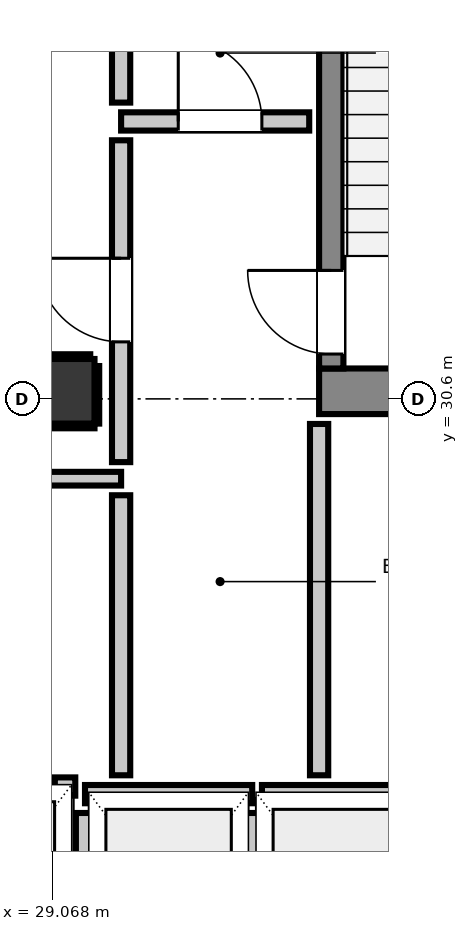
"""IFC4 building model, lengths in metres.
Left out: names, types, materials, properties, quantities, classifications, styles, units other than length and angle.
Written with IfcOpenShell. Run it as: python <this file> out.ifc"""

import sys

from ifc_helpers import new_model, si_unit, direction, frame, frame_2d, origin, origin_2d, place, context, subcontext, project, spatial, rectangle, extrude, element, fill, save


model = new_model("IFC4")
c1 = context("Model", 3, precision=1e-05, world=origin(), true_north=direction((0.0, 1.0)))
c2 = subcontext(c1, "Body", "Model", "MODEL_VIEW")
j1 = project(units=[si_unit("LENGTHUNIT", "METRE"), si_unit("PLANEANGLEUNIT", "RADIAN")], contexts=[c1])
p1 = place(None, origin())
s1 = spatial("IfcSite", under=j1, at=p1, CompositionType="ELEMENT")
p2 = place(p1, origin())
s2 = spatial("IfcBuilding", under=s1, at=p2, CompositionType="ELEMENT")
p3 = place(p2, frame((0.0, 0.0, 251.2)))
s3 = spatial("IfcBuildingStorey", under=s2, at=p3, CompositionType="ELEMENT", Elevation=251.2)
p4 = place(p3, frame((32.58, 30.7, 0.0), z_axis=(0.0, 0.0, 1.0), x_axis=(1.0, 0.0, 0.0)))
e1 = element("IfcWall", 1, at=p4, inside=s3, PredefinedType="SHEAR", context=c2, shape_type="SweptSolid", body=[
    extrude(rectangle(XDim=3.54, YDim=0.6, at=frame_2d((1.77, 0.0))), origin(), (0.0, 0.0, 1.0), 3.32),
])
p5 = place(p3, frame((32.74, 31.0, 0.0), z_axis=(0.0, 0.0, 1.0), x_axis=(0.0, 1.0, 0.0)))
e2 = element("IfcWall", 2, at=p5, inside=s3, PredefinedType="SHEAR", context=c2, shape_type="SweptSolid", body=[
    extrude(rectangle(XDim=7.8, YDim=0.32, at=frame_2d((3.9, 0.0))), origin(), (0.0, 0.0, 1.0), 3.32),
])
p6 = place(p5, frame((0.19, 0.0, 0.0)))
e3 = element("IfcOpeningElement", 3, at=p6, cuts=e2, PredefinedType="OPENING", context=c2, shape_type="SweptSolid", body=[
    extrude(rectangle(XDim=1.1, YDim=2.15, at=frame_2d((0.55, 1.075))), frame((0.0, 0.17, 0.0), z_axis=(0.0, -1.0, 0.0), x_axis=(1.0, 0.0, 0.0)), (0.0, 0.0, 1.0), 0.34),
])
p7 = place(p3, frame((29.2, 30.7, 0.0), z_axis=(0.0, 0.0, 1.0), x_axis=(1.0, 0.0, 0.0)))
e4 = element("IfcColumn", 4, at=p7, inside=s3, PredefinedType="COLUMN", context=c2, shape_type="SweptSolid", body=[
    extrude(rectangle(XDim=0.85, YDim=0.85, at=origin_2d()), origin(), (0.0, 0.0, 1.0), 3.32),
])
p8 = place(p3, frame((29.5, 25.4, 0.0), z_axis=(0.0, 0.0, 1.0), x_axis=(1.0, 0.0, 0.0)))
e5 = element("IfcWall", 5, at=p8, inside=s3, PredefinedType="PARTITIONING", context=c2, shape_type="SweptSolid", body=[
    extrude(rectangle(XDim=2.2, YDim=0.24, at=frame_2d((1.1, 0.0))), origin(), (0.0, 0.0, 1.0), 3.1),
])
p9 = place(p3, frame((29.5, 22.848, 0.0), z_axis=(0.0, 0.0, 1.0), x_axis=(0.0, 1.0, 0.0)))
e6 = element("IfcWall", 6, at=p9, inside=s3, PredefinedType="PARTITIONING", context=c2, shape_type="SweptSolid", body=[
    extrude(rectangle(XDim=2.304, YDim=0.24, at=frame_2d((1.152, 0.0))), origin(), (0.0, 0.0, 1.0), 2.335),
])
p10 = place(p3, frame((31.7, 22.848, 0.0), z_axis=(0.0, 0.0, 1.0), x_axis=(0.0, 1.0, 0.0)))
e7 = element("IfcWall", 7, at=p10, inside=s3, PredefinedType="PARTITIONING", context=c2, shape_type="SweptSolid", body=[
    extrude(rectangle(XDim=2.304, YDim=0.24, at=frame_2d((1.152, 0.0))), origin(), (0.0, 0.0, 1.0), 3.1),
])
p11 = place(p3, frame((31.828, 25.4, 0.0), z_axis=(0.0, 0.0, 1.0), x_axis=(1.0, 0.0, 0.0)))
e8 = element("IfcWall", 8, at=p11, inside=s3, PredefinedType="PARTITIONING", context=c2, shape_type="SweptSolid", body=[
    extrude(rectangle(XDim=2.072, YDim=0.24, at=frame_2d((1.036, 0.0))), origin(), (0.0, 0.0, 1.0), 3.1),
])
p12 = place(p3, frame((29.103, 25.5, 0.0), z_axis=(0.0, 0.0, 1.0), x_axis=(1.0, 0.0, 0.0)))
e9 = element("IfcWall", 9, at=p12, inside=s3, PredefinedType="PARTITIONING", context=c2, shape_type="SweptSolid", body=[
    extrude(rectangle(XDim=0.269, YDim=0.24, at=frame_2d((0.135, 0.0))), origin(), (0.0, 0.0, 1.0), 3.1),
])
p13 = place(p3, frame((29.975, 34.25, 0.0), z_axis=(0.0, 0.0, 1.0), x_axis=(1.0, 0.0, 0.0)))
e10 = element("IfcWall", 10, at=p13, inside=s3, PredefinedType="PARTITIONING", context=c2, shape_type="SweptSolid", body=[
    extrude(rectangle(XDim=2.475, YDim=0.24, at=frame_2d((1.237, 0.0))), origin(), (0.0, 0.0, 1.0), 3.1),
])
p14 = place(p13, frame((0.752, 0.0, 0.0)))
e11 = element("IfcOpeningElement", 11, at=p14, cuts=e10, PredefinedType="OPENING", context=c2, shape_type="SweptSolid", body=[
    extrude(rectangle(XDim=1.1, YDim=2.15, at=frame_2d((0.55, 1.075))), frame((0.0, 0.13, 0.0), z_axis=(0.0, -1.0, 0.0), x_axis=(1.0, 0.0, 0.0)), (0.0, 0.0, 1.0), 0.26),
])
p15 = place(p3, frame((28.593, 29.55, 0.0), z_axis=(0.0, 0.0, 1.0), x_axis=(1.0, 0.0, 0.0)))
e12 = element("IfcWall", 12, at=p15, inside=s3, PredefinedType="PARTITIONING", context=c2, shape_type="SweptSolid", body=[
    extrude(rectangle(XDim=1.382, YDim=0.18, at=frame_2d((0.691, 0.0))), origin(), (0.0, 0.0, 1.0), 3.1),
])
p16 = place(p3, frame((29.975, 25.648, 0.0), z_axis=(0.0, 0.0, 1.0), x_axis=(0.0, 1.0, 0.0)))
e13 = element("IfcWall", 13, at=p16, inside=s3, PredefinedType="PARTITIONING", context=c2, shape_type="SweptSolid", body=[
    extrude(rectangle(XDim=3.684, YDim=0.24, at=frame_2d((1.842, 0.0))), origin(), (0.0, 0.0, 1.0), 3.1),
])
p17 = place(p3, frame((29.975, 29.768, 0.0), z_axis=(0.0, 0.0, 1.0), x_axis=(0.0, 1.0, 0.0)))
e14 = element("IfcWall", 14, at=p17, inside=s3, PredefinedType="PARTITIONING", context=c2, shape_type="SweptSolid", body=[
    extrude(rectangle(XDim=4.234, YDim=0.24, at=frame_2d((2.117, 0.0))), origin(), (0.0, 0.0, 1.0), 3.1),
])
p18 = place(p17, frame((1.582, 0.0, 0.0)))
e15 = element("IfcOpeningElement", 15, at=p18, cuts=e14, PredefinedType="OPENING", context=c2, shape_type="SweptSolid", body=[
    extrude(rectangle(XDim=1.1, YDim=2.15, at=frame_2d((0.55, 1.075))), frame((0.0, 0.13, 0.0), z_axis=(0.0, -1.0, 0.0), x_axis=(1.0, 0.0, 0.0)), (0.0, 0.0, 1.0), 0.26),
])
p19 = place(p3, frame((29.975, 34.498, 0.0), z_axis=(0.0, 0.0, 1.0), x_axis=(0.0, 1.0, 0.0)))
e16 = element("IfcWall", 16, at=p19, inside=s3, PredefinedType="PARTITIONING", context=c2, shape_type="SweptSolid", body=[
    extrude(rectangle(XDim=0.934, YDim=0.24, at=frame_2d((0.467, 0.0))), origin(), (0.0, 0.0, 1.0), 3.1),
])
p20 = place(p3, frame((32.58, 25.648, 0.0), z_axis=(0.0, 0.0, 1.0), x_axis=(0.0, 1.0, 0.0)))
e17 = element("IfcWall", 17, at=p20, inside=s3, PredefinedType="PARTITIONING", context=c2, shape_type="SweptSolid", body=[
    extrude(rectangle(XDim=4.622, YDim=0.24, at=frame_2d((2.311, 0.0))), origin(), (0.0, 0.0, 1.0), 3.1),
])
p21 = place(p3, frame((28.775, 30.243, 0.0), z_axis=(0.0, 0.0, 1.0), x_axis=(1.0, 0.0, 0.0)))
e18 = element("IfcWall", 18, at=p21, inside=s3, PredefinedType="PARTITIONING", context=c2, shape_type="SweptSolid", body=[
    extrude(rectangle(XDim=0.85, YDim=0.06, at=frame_2d((0.425, 0.0))), origin(), (0.0, 0.0, 1.0), 1.45),
])
p22 = place(p3, frame((28.775, 31.157, 0.0), z_axis=(0.0, 0.0, 1.0), x_axis=(1.0, 0.0, 0.0)))
e19 = element("IfcWall", 19, at=p22, inside=s3, PredefinedType="PARTITIONING", context=c2, shape_type="SweptSolid", body=[
    extrude(rectangle(XDim=0.794, YDim=0.06, at=frame_2d((0.397, 0.0))), origin(), (0.0, 0.0, 1.0), 1.45),
])
p23 = place(p3, frame((29.657, 30.275, 0.0), z_axis=(0.0, 0.0, 1.0), x_axis=(0.0, 1.0, 0.0)))
e20 = element("IfcWall", 20, at=p23, inside=s3, PredefinedType="PARTITIONING", context=c2, shape_type="SweptSolid", body=[
    extrude(rectangle(XDim=0.757, YDim=0.06, at=frame_2d((0.378, 0.0))), origin(), (0.0, 0.0, 1.0), 1.45),
])
p24 = place(p6, origin())
e21 = element("IfcDoor", 21, at=p24, inside=s3, OperationType="SINGLE_SWING_RIGHT", PredefinedType="DOOR", context=c2, shape_type="SweptSolid", body=[
    extrude(rectangle(XDim=1.1, YDim=2.15, at=frame_2d((0.55, 1.075))), frame((0.0, 0.025, 0.0), z_axis=(0.0, -1.0, 0.0), x_axis=(1.0, 0.0, 0.0)), (0.0, 0.0, 1.0), 0.05),
])
fill(e3, e21)
p25 = place(p18, origin())
e22 = element("IfcDoor", 22, at=p25, inside=s3, OperationType="SINGLE_SWING_RIGHT", PredefinedType="DOOR", context=c2, shape_type="SweptSolid", body=[
    extrude(rectangle(XDim=1.1, YDim=2.15, at=frame_2d((0.55, 1.075))), frame((0.0, 0.025, 0.0), z_axis=(0.0, -1.0, 0.0), x_axis=(1.0, 0.0, 0.0)), (0.0, 0.0, 1.0), 0.05),
])
fill(e15, e22)
p26 = place(p14, origin())
e23 = element("IfcDoor", 23, at=p26, inside=s3, OperationType="SINGLE_SWING_LEFT", PredefinedType="DOOR", context=c2, shape_type="SweptSolid", body=[
    extrude(rectangle(XDim=1.1, YDim=2.15, at=frame_2d((0.55, 1.075))), frame((0.0, 0.025, 0.0), z_axis=(0.0, -1.0, 0.0), x_axis=(1.0, 0.0, 0.0)), (0.0, 0.0, 1.0), 0.05),
])
fill(e11, e23)
save(model, sys.argv[1])
